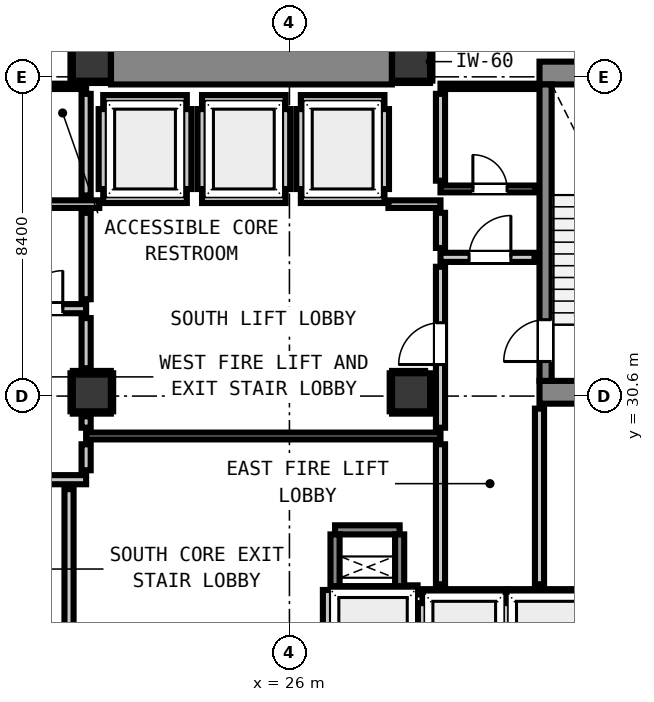
"""IFC4 building model, lengths in metres.
Left out: names, types, materials, properties, quantities, classifications, styles, units other than length and angle.
Written with IfcOpenShell. Run it as: python <this file> out.ifc"""

import sys

from ifc_helpers import new_model, si_unit, direction, frame, frame_2d, origin, origin_2d, place, context, subcontext, project, spatial, rectangle, extrude, element, fill, save


model = new_model("IFC4")
c1 = context("Model", 3, precision=1e-05, world=origin(), true_north=direction((0.0, 1.0)))
c2 = subcontext(c1, "Body", "Model", "MODEL_VIEW")
j1 = project(units=[si_unit("LENGTHUNIT", "METRE"), si_unit("PLANEANGLEUNIT", "RADIAN")], contexts=[c1])
p1 = place(None, origin())
s1 = spatial("IfcSite", under=j1, at=p1, CompositionType="ELEMENT")
p2 = place(p1, origin())
s2 = spatial("IfcBuilding", under=s1, at=p2, CompositionType="ELEMENT")
p3 = place(p2, frame((0.0, 0.0, 17.8)))
s3 = spatial("IfcBuildingStorey", under=s2, at=p3, CompositionType="ELEMENT", Elevation=17.8)
for number, where, z_axis, x_axis in (
    (1, (20.8, 39.4, 0.0), (0.0, 0.0, 1.0), (1.0, 0.0, 0.0)),
    (2, (29.2, 39.4, 0.0), (0.0, 0.0, 1.0), (1.0, 0.0, 0.0)),
):
    element("IfcColumn", number, at=place(p3, frame(where, z_axis=z_axis, x_axis=x_axis)), inside=s3, PredefinedType="COLUMN", context=c2, shape_type="SweptSolid", body=[
        extrude(rectangle(XDim=1.0, YDim=1.0, at=origin_2d()), origin(), (0.0, 0.0, 1.0), 4.2),
    ])
p4 = place(p3, frame((32.58, 39.1, 0.0), z_axis=(0.0, 0.0, 1.0), x_axis=(1.0, 0.0, 0.0)))
e3 = element("IfcWall", 3, at=p4, inside=s3, PredefinedType="SHEAR", context=c2, shape_type="SweptSolid", body=[
    extrude(rectangle(XDim=4.08, YDim=0.6, at=frame_2d((2.04, 0.0))), origin(), (0.0, 0.0, 1.0), 4.2),
])
p5 = place(p3, frame((32.58, 30.7, 0.0), z_axis=(0.0, 0.0, 1.0), x_axis=(1.0, 0.0, 0.0)))
e4 = element("IfcWall", 4, at=p5, inside=s3, PredefinedType="SHEAR", context=c2, shape_type="SweptSolid", body=[
    extrude(rectangle(XDim=3.415, YDim=0.6, at=frame_2d((1.708, 0.0))), origin(), (0.0, 0.0, 1.0), 4.2),
])
p6 = place(p3, frame((21.305, 39.4, 0.0), z_axis=(0.0, 0.0, 1.0), x_axis=(1.0, 0.0, 0.0)))
e5 = element("IfcWall", 5, at=p6, inside=s3, PredefinedType="SHEAR", context=c2, shape_type="SweptSolid", body=[
    extrude(rectangle(XDim=7.39, YDim=1.2, at=frame_2d((3.695, 0.0))), origin(), (0.0, 0.0, 1.0), 4.2),
])
p7 = place(p3, frame((32.74, 31.0, 0.0), z_axis=(0.0, 0.0, 1.0), x_axis=(0.0, 1.0, 0.0)))
e6 = element("IfcWall", 6, at=p7, inside=s3, PredefinedType="SHEAR", context=c2, shape_type="SweptSolid", body=[
    extrude(rectangle(XDim=7.8, YDim=0.32, at=frame_2d((3.9, 0.0))), origin(), (0.0, 0.0, 1.0), 4.2),
])
p8 = place(p7, frame((0.51, 0.0, 0.0)))
e7 = element("IfcOpeningElement", 7, at=p8, cuts=e6, PredefinedType="OPENING", context=c2, shape_type="SweptSolid", body=[
    extrude(rectangle(XDim=1.1, YDim=2.15, at=frame_2d((0.55, 1.075))), frame((0.0, 0.17, 0.0), z_axis=(0.0, -1.0, 0.0), x_axis=(1.0, 0.0, 0.0)), (0.0, 0.0, 1.0), 0.34),
])
for number, where, z_axis, x_axis in (
    (8, (27.2, 25.48, 0.0), (0.0, 0.0, 1.0), (1.0, 0.0, 0.0)),
    (9, (27.2, 27.08, 0.0), (0.0, 0.0, 1.0), (1.0, 0.0, 0.0)),
):
    element("IfcWall", number, at=place(p3, frame(where, z_axis=z_axis, x_axis=x_axis)), inside=s3, PredefinedType="SHEAR", context=c2, shape_type="SweptSolid", body=[
        extrude(rectangle(XDim=1.7, YDim=0.24, at=frame_2d((0.85, 0.0))), origin(), (0.0, 0.0, 1.0), 4.2),
    ])
for number, where, z_axis, x_axis in (
    (10, (27.2, 25.6, 0.0), (0.0, 0.0, 1.0), (0.0, 1.0, 0.0)),
    (11, (28.9, 25.6, 0.0), (0.0, 0.0, 1.0), (0.0, 1.0, 0.0)),
):
    element("IfcWall", number, at=place(p3, frame(where, z_axis=z_axis, x_axis=x_axis)), inside=s3, PredefinedType="SHEAR", context=c2, shape_type="SweptSolid", body=[
        extrude(rectangle(XDim=1.36, YDim=0.24, at=frame_2d((0.68, 0.0))), origin(), (0.0, 0.0, 1.0), 4.2),
    ])
for number, where, z_axis, x_axis in (
    (12, (20.8, 30.7, 0.0), (0.0, 0.0, 1.0), (1.0, 0.0, 0.0)),
    (13, (29.2, 30.7, 0.0), (0.0, 0.0, 1.0), (1.0, 0.0, 0.0)),
):
    element("IfcColumn", number, at=place(p3, frame(where, z_axis=z_axis, x_axis=x_axis)), inside=s3, PredefinedType="COLUMN", context=c2, shape_type="SweptSolid", body=[
        extrude(rectangle(XDim=1.0, YDim=1.0, at=origin_2d()), origin(), (0.0, 0.0, 1.0), 4.2),
    ])
for number, where, z_axis, x_axis in (
    (14, (21.1, 35.8, 0.0), (0.0, 0.0, 1.0), (1.0, 0.0, 0.0)),
    (15, (21.1, 38.4, 0.0), (0.0, 0.0, 1.0), (1.0, 0.0, 0.0)),
):
    element("IfcWall", number, at=place(p3, frame(where, z_axis=z_axis, x_axis=x_axis)), inside=s3, PredefinedType="PARTITIONING", context=c2, shape_type="SweptSolid", body=[
        extrude(rectangle(XDim=2.2, YDim=0.24, at=frame_2d((1.1, 0.0))), origin(), (0.0, 0.0, 1.0), 3.78),
    ])
p9 = place(p3, frame((21.1, 36.048, 0.0), z_axis=(0.0, 0.0, 1.0), x_axis=(0.0, 1.0, 0.0)))
e16 = element("IfcWall", 16, at=p9, inside=s3, PredefinedType="PARTITIONING", context=c2, shape_type="SweptSolid", body=[
    extrude(rectangle(XDim=2.104, YDim=0.24, at=frame_2d((1.052, 0.0))), origin(), (0.0, 0.0, 1.0), 1.785),
])
p10 = place(p3, frame((23.3, 36.048, 0.0), z_axis=(0.0, 0.0, 1.0), x_axis=(0.0, 1.0, 0.0)))
e17 = element("IfcWall", 17, at=p10, inside=s3, PredefinedType="PARTITIONING", context=c2, shape_type="SweptSolid", body=[
    extrude(rectangle(XDim=2.104, YDim=0.24, at=frame_2d((1.052, 0.0))), origin(), (0.0, 0.0, 1.0), 3.78),
])
for number, where, z_axis, x_axis in (
    (18, (23.7, 35.8, 0.0), (0.0, 0.0, 1.0), (1.0, 0.0, 0.0)),
    (19, (23.7, 38.4, 0.0), (0.0, 0.0, 1.0), (1.0, 0.0, 0.0)),
):
    element("IfcWall", number, at=place(p3, frame(where, z_axis=z_axis, x_axis=x_axis)), inside=s3, PredefinedType="PARTITIONING", context=c2, shape_type="SweptSolid", body=[
        extrude(rectangle(XDim=2.2, YDim=0.24, at=frame_2d((1.1, 0.0))), origin(), (0.0, 0.0, 1.0), 3.78),
    ])
for number, where, z_axis, x_axis in (
    (20, (23.7, 36.048, 0.0), (0.0, 0.0, 1.0), (0.0, 1.0, 0.0)),
    (21, (25.9, 36.048, 0.0), (0.0, 0.0, 1.0), (0.0, 1.0, 0.0)),
):
    element("IfcWall", number, at=place(p3, frame(where, z_axis=z_axis, x_axis=x_axis)), inside=s3, PredefinedType="PARTITIONING", context=c2, shape_type="SweptSolid", body=[
        extrude(rectangle(XDim=2.104, YDim=0.24, at=frame_2d((1.052, 0.0))), origin(), (0.0, 0.0, 1.0), 3.78),
    ])
for number, where, z_axis, x_axis in (
    (22, (26.3, 35.8, 0.0), (0.0, 0.0, 1.0), (1.0, 0.0, 0.0)),
    (23, (26.3, 38.4, 0.0), (0.0, 0.0, 1.0), (1.0, 0.0, 0.0)),
):
    element("IfcWall", number, at=place(p3, frame(where, z_axis=z_axis, x_axis=x_axis)), inside=s3, PredefinedType="PARTITIONING", context=c2, shape_type="SweptSolid", body=[
        extrude(rectangle(XDim=2.2, YDim=0.24, at=frame_2d((1.1, 0.0))), origin(), (0.0, 0.0, 1.0), 3.78),
    ])
p11 = place(p3, frame((26.3, 36.048, 0.0), z_axis=(0.0, 0.0, 1.0), x_axis=(0.0, 1.0, 0.0)))
e24 = element("IfcWall", 24, at=p11, inside=s3, PredefinedType="PARTITIONING", context=c2, shape_type="SweptSolid", body=[
    extrude(rectangle(XDim=2.104, YDim=0.24, at=frame_2d((1.052, 0.0))), origin(), (0.0, 0.0, 1.0), 3.78),
])
p12 = place(p3, frame((28.5, 36.048, 0.0), z_axis=(0.0, 0.0, 1.0), x_axis=(0.0, 1.0, 0.0)))
e25 = element("IfcWall", 25, at=p12, inside=s3, PredefinedType="PARTITIONING", context=c2, shape_type="SweptSolid", body=[
    extrude(rectangle(XDim=2.104, YDim=0.24, at=frame_2d((1.052, 0.0))), origin(), (0.0, 0.0, 1.0), 1.785),
])
p13 = place(p3, frame((29.5, 25.4, 0.0), z_axis=(0.0, 0.0, 1.0), x_axis=(1.0, 0.0, 0.0)))
e26 = element("IfcWall", 26, at=p13, inside=s3, PredefinedType="PARTITIONING", context=c2, shape_type="SweptSolid", body=[
    extrude(rectangle(XDim=2.2, YDim=0.24, at=frame_2d((1.1, 0.0))), origin(), (0.0, 0.0, 1.0), 3.78),
])
p14 = place(p3, frame((29.5, 22.632, 0.0), z_axis=(0.0, 0.0, 1.0), x_axis=(0.0, 1.0, 0.0)))
e27 = element("IfcWall", 27, at=p14, inside=s3, PredefinedType="PARTITIONING", context=c2, shape_type="SweptSolid", body=[
    extrude(rectangle(XDim=2.52, YDim=0.24, at=frame_2d((1.26, 0.0))), origin(), (0.0, 0.0, 1.0), 1.785),
])
p15 = place(p3, frame((31.7, 22.73, 0.0), z_axis=(0.0, 0.0, 1.0), x_axis=(0.0, 1.0, 0.0)))
e28 = element("IfcWall", 28, at=p15, inside=s3, PredefinedType="PARTITIONING", context=c2, shape_type="SweptSolid", body=[
    extrude(rectangle(XDim=2.422, YDim=0.24, at=frame_2d((1.211, 0.0))), origin(), (0.0, 0.0, 1.0), 3.78),
])
p16 = place(p3, frame((31.828, 25.4, 0.0), z_axis=(0.0, 0.0, 1.0), x_axis=(1.0, 0.0, 0.0)))
e29 = element("IfcWall", 29, at=p16, inside=s3, PredefinedType="PARTITIONING", context=c2, shape_type="SweptSolid", body=[
    extrude(rectangle(XDim=2.072, YDim=0.24, at=frame_2d((1.036, 0.0))), origin(), (0.0, 0.0, 1.0), 3.78),
])
p17 = place(p3, frame((29.103, 25.5, 0.0), z_axis=(0.0, 0.0, 1.0), x_axis=(1.0, 0.0, 0.0)))
e30 = element("IfcWall", 30, at=p17, inside=s3, PredefinedType="PARTITIONING", context=c2, shape_type="SweptSolid", body=[
    extrude(rectangle(XDim=0.269, YDim=0.24, at=frame_2d((0.135, 0.0))), origin(), (0.0, 0.0, 1.0), 3.78),
])
p18 = place(p3, frame((27.0, 22.73, 0.0), z_axis=(0.0, 0.0, 1.0), x_axis=(0.0, 1.0, 0.0)))
e31 = element("IfcWall", 31, at=p18, inside=s3, PredefinedType="PARTITIONING", context=c2, shape_type="SweptSolid", body=[
    extrude(rectangle(XDim=2.768, YDim=0.24, at=frame_2d((1.384, 0.0))), origin(), (0.0, 0.0, 1.0), 3.78),
])
p19 = place(p3, frame((17.45, 28.4, 0.0), z_axis=(0.0, 0.0, 1.0), x_axis=(1.0, 0.0, 0.0)))
e32 = element("IfcWall", 32, at=p19, inside=s3, PredefinedType="PARTITIONING", context=c2, shape_type="SweptSolid", body=[
    extrude(rectangle(XDim=3.2, YDim=0.24, at=frame_2d((1.6, 0.0))), origin(), (0.0, 0.0, 1.0), 3.78),
])
p20 = place(p19, frame((0.784, 0.0, 0.0)))
e33 = element("IfcOpeningElement", 33, at=p20, cuts=e32, PredefinedType="OPENING", context=c2, shape_type="SweptSolid", body=[
    extrude(rectangle(XDim=1.1, YDim=2.15, at=frame_2d((0.55, 1.075))), frame((0.0, 0.13, 0.0), z_axis=(0.0, -1.0, 0.0), x_axis=(1.0, 0.0, 0.0)), (0.0, 0.0, 1.0), 0.26),
])
p21 = place(p3, frame((17.45, 32.9, 0.0), z_axis=(0.0, 0.0, 1.0), x_axis=(1.0, 0.0, 0.0)))
e34 = element("IfcWall", 34, at=p21, inside=s3, PredefinedType="PARTITIONING", context=c2, shape_type="SweptSolid", body=[
    extrude(rectangle(XDim=3.2, YDim=0.24, at=frame_2d((1.6, 0.0))), origin(), (0.0, 0.0, 1.0), 3.78),
])
p22 = place(p21, frame((0.159, 0.0, 0.0)))
e35 = element("IfcOpeningElement", 35, at=p22, cuts=e34, PredefinedType="OPENING", context=c2, shape_type="SweptSolid", body=[
    extrude(rectangle(XDim=1.1, YDim=2.15, at=frame_2d((0.55, 1.075))), frame((0.0, 0.13, 0.0), z_axis=(0.0, -1.0, 0.0), x_axis=(1.0, 0.0, 0.0)), (0.0, 0.0, 1.0), 0.26),
])
p23 = place(p21, frame((1.586, 0.0, 0.0)))
e36 = element("IfcOpeningElement", 36, at=p23, cuts=e34, PredefinedType="OPENING", context=c2, shape_type="SweptSolid", body=[
    extrude(rectangle(XDim=1.0, YDim=2.15, at=frame_2d((0.5, 1.075))), frame((0.0, 0.13, 0.0), z_axis=(0.0, -1.0, 0.0), x_axis=(1.0, 0.0, 0.0)), (0.0, 0.0, 1.0), 0.26),
])
p24 = place(p3, frame((29.975, 34.25, 0.0), z_axis=(0.0, 0.0, 1.0), x_axis=(1.0, 0.0, 0.0)))
e37 = element("IfcWall", 37, at=p24, inside=s3, PredefinedType="PARTITIONING", context=c2, shape_type="SweptSolid", body=[
    extrude(rectangle(XDim=2.475, YDim=0.24, at=frame_2d((1.237, 0.0))), origin(), (0.0, 0.0, 1.0), 3.78),
])
p25 = place(p24, frame((0.752, 0.0, 0.0)))
e38 = element("IfcOpeningElement", 38, at=p25, cuts=e37, PredefinedType="OPENING", context=c2, shape_type="SweptSolid", body=[
    extrude(rectangle(XDim=1.1, YDim=2.15, at=frame_2d((0.55, 1.075))), frame((0.0, 0.13, 0.0), z_axis=(0.0, -1.0, 0.0), x_axis=(1.0, 0.0, 0.0)), (0.0, 0.0, 1.0), 0.26),
])
p26 = place(p3, frame((18.95, 35.65, 0.0), z_axis=(0.0, 0.0, 1.0), x_axis=(1.0, 0.0, 0.0)))
e39 = element("IfcWall", 39, at=p26, inside=s3, PredefinedType="PARTITIONING", context=c2, shape_type="SweptSolid", body=[
    extrude(rectangle(XDim=2.046, YDim=0.2, at=frame_2d((1.023, 0.0))), origin(), (0.0, 0.0, 1.0), 3.78),
])
p27 = place(p3, frame((28.604, 35.65, 0.0), z_axis=(0.0, 0.0, 1.0), x_axis=(1.0, 0.0, 0.0)))
e40 = element("IfcWall", 40, at=p27, inside=s3, PredefinedType="PARTITIONING", context=c2, shape_type="SweptSolid", body=[
    extrude(rectangle(XDim=1.371, YDim=0.2, at=frame_2d((0.686, 0.0))), origin(), (0.0, 0.0, 1.0), 3.78),
])
p28 = place(p3, frame((20.65, 29.55, 0.0), z_axis=(0.0, 0.0, 1.0), x_axis=(1.0, 0.0, 0.0)))
e41 = element("IfcWall", 41, at=p28, inside=s3, PredefinedType="PARTITIONING", context=c2, shape_type="SweptSolid", body=[
    extrude(rectangle(XDim=9.325, YDim=0.18, at=frame_2d((4.663, 0.0))), origin(), (0.0, 0.0, 1.0), 3.78),
])
p29 = place(p3, frame((29.975, 36.05, 0.0), z_axis=(0.0, 0.0, 1.0), x_axis=(1.0, 0.0, 0.0)))
e42 = element("IfcWall", 42, at=p29, inside=s3, PredefinedType="PARTITIONING", context=c2, shape_type="SweptSolid", body=[
    extrude(rectangle(XDim=2.505, YDim=0.18, at=frame_2d((1.252, 0.0))), origin(), (0.0, 0.0, 1.0), 3.78),
])
p30 = place(p29, frame((0.852, 0.0, 0.0)))
e43 = element("IfcOpeningElement", 43, at=p30, cuts=e42, PredefinedType="OPENING", context=c2, shape_type="SweptSolid", body=[
    extrude(rectangle(XDim=0.9, YDim=2.1, at=frame_2d((0.45, 1.05))), frame((0.0, 0.1, 0.0), z_axis=(0.0, -1.0, 0.0), x_axis=(1.0, 0.0, 0.0)), (0.0, 0.0, 1.0), 0.2),
])
p31 = place(p3, frame((18.95, 38.75, 0.0), z_axis=(0.0, 0.0, 1.0), x_axis=(1.0, 0.0, 0.0)))
e44 = element("IfcWall", 44, at=p31, inside=s3, PredefinedType="PARTITIONING", context=c2, shape_type="SweptSolid", body=[
    extrude(rectangle(XDim=1.7, YDim=0.14, at=frame_2d((0.85, 0.0))), origin(), (0.0, 0.0, 1.0), 1.785),
])
p32 = place(p3, frame((29.975, 38.75, 0.0), z_axis=(0.0, 0.0, 1.0), x_axis=(1.0, 0.0, 0.0)))
e45 = element("IfcWall", 45, at=p32, inside=s3, PredefinedType="PARTITIONING", context=c2, shape_type="SweptSolid", body=[
    extrude(rectangle(XDim=2.525, YDim=0.14, at=frame_2d((1.262, 0.0))), origin(), (0.0, 0.0, 1.0), 1.785),
])
p33 = place(p3, frame((20.2, 22.586, 0.0), z_axis=(0.0, 0.0, 1.0), x_axis=(0.0, 1.0, 0.0)))
e46 = element("IfcWall", 46, at=p33, inside=s3, PredefinedType="PARTITIONING", context=c2, shape_type="SweptSolid", body=[
    extrude(rectangle(XDim=5.566, YDim=0.24, at=frame_2d((2.783, 0.0))), origin(), (0.0, 0.0, 1.0), 1.785),
])
p34 = place(p3, frame((20.65, 28.648, 0.0), z_axis=(0.0, 0.0, 1.0), x_axis=(0.0, 1.0, 0.0)))
e47 = element("IfcWall", 47, at=p34, inside=s3, PredefinedType="PARTITIONING", context=c2, shape_type="SweptSolid", body=[
    extrude(rectangle(XDim=0.684, YDim=0.24, at=frame_2d((0.342, 0.0))), origin(), (0.0, 0.0, 1.0), 1.785),
])
p35 = place(p3, frame((20.65, 29.768, 0.0), z_axis=(0.0, 0.0, 1.0), x_axis=(0.0, 1.0, 0.0)))
e48 = element("IfcWall", 48, at=p35, inside=s3, PredefinedType="PARTITIONING", context=c2, shape_type="SweptSolid", body=[
    extrude(rectangle(XDim=0.3, YDim=0.24, at=frame_2d((0.15, 0.0))), origin(), (0.0, 0.0, 1.0), 1.785),
])
p36 = place(p3, frame((20.65, 31.332, 0.0), z_axis=(0.0, 0.0, 1.0), x_axis=(0.0, 1.0, 0.0)))
e49 = element("IfcWall", 49, at=p36, inside=s3, PredefinedType="PARTITIONING", context=c2, shape_type="SweptSolid", body=[
    extrude(rectangle(XDim=1.32, YDim=0.24, at=frame_2d((0.66, 0.0))), origin(), (0.0, 0.0, 1.0), 1.785),
])
p37 = place(p3, frame((20.65, 33.148, 0.0), z_axis=(0.0, 0.0, 1.0), x_axis=(0.0, 1.0, 0.0)))
e50 = element("IfcWall", 50, at=p37, inside=s3, PredefinedType="PARTITIONING", context=c2, shape_type="SweptSolid", body=[
    extrude(rectangle(XDim=2.274, YDim=0.24, at=frame_2d((1.137, 0.0))), origin(), (0.0, 0.0, 1.0), 1.785),
])
p38 = place(p3, frame((20.65, 35.878, 0.0), z_axis=(0.0, 0.0, 1.0), x_axis=(0.0, 1.0, 0.0)))
e51 = element("IfcWall", 51, at=p38, inside=s3, PredefinedType="PARTITIONING", context=c2, shape_type="SweptSolid", body=[
    extrude(rectangle(XDim=2.674, YDim=0.24, at=frame_2d((1.337, 0.0))), origin(), (0.0, 0.0, 1.0), 1.785),
])
p39 = place(p3, frame((29.975, 25.648, 0.0), z_axis=(0.0, 0.0, 1.0), x_axis=(0.0, 1.0, 0.0)))
e52 = element("IfcWall", 52, at=p39, inside=s3, PredefinedType="PARTITIONING", context=c2, shape_type="SweptSolid", body=[
    extrude(rectangle(XDim=3.684, YDim=0.24, at=frame_2d((1.842, 0.0))), origin(), (0.0, 0.0, 1.0), 3.78),
])
p40 = place(p3, frame((29.975, 29.768, 0.0), z_axis=(0.0, 0.0, 1.0), x_axis=(0.0, 1.0, 0.0)))
e53 = element("IfcWall", 53, at=p40, inside=s3, PredefinedType="PARTITIONING", context=c2, shape_type="SweptSolid", body=[
    extrude(rectangle(XDim=4.234, YDim=0.24, at=frame_2d((2.117, 0.0))), origin(), (0.0, 0.0, 1.0), 3.78),
])
p41 = place(p40, frame((1.662, 0.0, 0.0)))
e54 = element("IfcOpeningElement", 54, at=p41, cuts=e53, PredefinedType="OPENING", context=c2, shape_type="SweptSolid", body=[
    extrude(rectangle(XDim=1.1, YDim=2.15, at=frame_2d((0.55, 1.075))), frame((0.0, 0.13, 0.0), z_axis=(0.0, -1.0, 0.0), x_axis=(1.0, 0.0, 0.0)), (0.0, 0.0, 1.0), 0.26),
])
p42 = place(p3, frame((29.975, 34.498, 0.0), z_axis=(0.0, 0.0, 1.0), x_axis=(0.0, 1.0, 0.0)))
e55 = element("IfcWall", 55, at=p42, inside=s3, PredefinedType="PARTITIONING", context=c2, shape_type="SweptSolid", body=[
    extrude(rectangle(XDim=0.924, YDim=0.24, at=frame_2d((0.462, 0.0))), origin(), (0.0, 0.0, 1.0), 3.78),
])
p43 = place(p3, frame((29.975, 36.268, 0.0), z_axis=(0.0, 0.0, 1.0), x_axis=(0.0, 1.0, 0.0)))
e56 = element("IfcWall", 56, at=p43, inside=s3, PredefinedType="PARTITIONING", context=c2, shape_type="SweptSolid", body=[
    extrude(rectangle(XDim=2.284, YDim=0.24, at=frame_2d((1.142, 0.0))), origin(), (0.0, 0.0, 1.0), 3.78),
])
p44 = place(p3, frame((32.58, 25.648, 0.0), z_axis=(0.0, 0.0, 1.0), x_axis=(0.0, 1.0, 0.0)))
e57 = element("IfcWall", 57, at=p44, inside=s3, PredefinedType="PARTITIONING", context=c2, shape_type="SweptSolid", body=[
    extrude(rectangle(XDim=4.622, YDim=0.24, at=frame_2d((2.311, 0.0))), origin(), (0.0, 0.0, 1.0), 3.78),
])
p45 = place(p3, frame((20.3, 38.868, 0.0), z_axis=(0.0, 0.0, 1.0), x_axis=(1.0, 0.0, 0.0)))
e58 = element("IfcWall", 58, at=p45, inside=s3, PredefinedType="PARTITIONING", context=c2, shape_type="SweptSolid", body=[
    extrude(rectangle(XDim=0.99, YDim=0.06, at=frame_2d((0.495, 0.0))), origin(), (0.0, 0.0, 1.0), 1.45),
])
p46 = place(p3, frame((20.268, 38.9, 0.0), z_axis=(0.0, 0.0, 1.0), x_axis=(0.0, 1.0, 0.0)))
e59 = element("IfcWall", 59, at=p46, inside=s3, PredefinedType="PARTITIONING", context=c2, shape_type="SweptSolid", body=[
    extrude(rectangle(XDim=1.0, YDim=0.06, at=frame_2d((0.5, 0.0))), origin(), (0.0, 0.0, 1.0), 1.45),
])
p47 = place(p3, frame((28.71, 38.868, 0.0), z_axis=(0.0, 0.0, 1.0), x_axis=(1.0, 0.0, 0.0)))
e60 = element("IfcWall", 60, at=p47, inside=s3, PredefinedType="PARTITIONING", context=c2, shape_type="SweptSolid", body=[
    extrude(rectangle(XDim=0.99, YDim=0.06, at=frame_2d((0.495, 0.0))), origin(), (0.0, 0.0, 1.0), 1.45),
])
for number, where, z_axis, x_axis in (
    (61, (29.732, 38.9, 0.0), (0.0, 0.0, 1.0), (0.0, 1.0, 0.0)),
    (62, (20.3, 30.168, 0.0), (0.0, 0.0, 1.0), (1.0, 0.0, 0.0)),
    (63, (20.3, 31.232, 0.0), (0.0, 0.0, 1.0), (1.0, 0.0, 0.0)),
    (64, (20.268, 30.2, 0.0), (0.0, 0.0, 1.0), (0.0, 1.0, 0.0)),
    (65, (21.332, 30.2, 0.0), (0.0, 0.0, 1.0), (0.0, 1.0, 0.0)),
    (66, (28.7, 30.168, 0.0), (0.0, 0.0, 1.0), (1.0, 0.0, 0.0)),
):
    element("IfcWall", number, at=place(p3, frame(where, z_axis=z_axis, x_axis=x_axis)), inside=s3, PredefinedType="PARTITIONING", context=c2, shape_type="SweptSolid", body=[
        extrude(rectangle(XDim=1.0, YDim=0.06, at=frame_2d((0.5, 0.0))), origin(), (0.0, 0.0, 1.0), 1.45),
    ])
p48 = place(p3, frame((28.7, 31.232, 0.0), z_axis=(0.0, 0.0, 1.0), x_axis=(1.0, 0.0, 0.0)))
e67 = element("IfcWall", 67, at=p48, inside=s3, PredefinedType="PARTITIONING", context=c2, shape_type="SweptSolid", body=[
    extrude(rectangle(XDim=0.871, YDim=0.06, at=frame_2d((0.436, 0.0))), origin(), (0.0, 0.0, 1.0), 1.45),
])
p49 = place(p3, frame((28.668, 30.2, 0.0), z_axis=(0.0, 0.0, 1.0), x_axis=(0.0, 1.0, 0.0)))
e68 = element("IfcWall", 68, at=p49, inside=s3, PredefinedType="PARTITIONING", context=c2, shape_type="SweptSolid", body=[
    extrude(rectangle(XDim=1.0, YDim=0.06, at=frame_2d((0.5, 0.0))), origin(), (0.0, 0.0, 1.0), 1.45),
])
p50 = place(p3, frame((29.732, 30.2, 0.0), z_axis=(0.0, 0.0, 1.0), x_axis=(0.0, 1.0, 0.0)))
e69 = element("IfcWall", 69, at=p50, inside=s3, PredefinedType="PARTITIONING", context=c2, shape_type="SweptSolid", body=[
    extrude(rectangle(XDim=0.852, YDim=0.06, at=frame_2d((0.426, 0.0))), origin(), (0.0, 0.0, 1.0), 1.45),
])
p51 = place(p8, origin())
e70 = element("IfcDoor", 70, at=p51, inside=s3, OperationType="SINGLE_SWING_LEFT", PredefinedType="DOOR", context=c2, shape_type="SweptSolid", body=[
    extrude(rectangle(XDim=1.1, YDim=2.15, at=frame_2d((0.55, 1.075))), frame((0.0, 0.025, 0.0), z_axis=(0.0, -1.0, 0.0), x_axis=(1.0, 0.0, 0.0)), (0.0, 0.0, 1.0), 0.05),
])
fill(e7, e70)
p52 = place(p41, origin())
e71 = element("IfcDoor", 71, at=p52, inside=s3, OperationType="SINGLE_SWING_LEFT", PredefinedType="DOOR", context=c2, shape_type="SweptSolid", body=[
    extrude(rectangle(XDim=1.1, YDim=2.15, at=frame_2d((0.55, 1.075))), frame((0.0, 0.025, 0.0), z_axis=(0.0, -1.0, 0.0), x_axis=(1.0, 0.0, 0.0)), (0.0, 0.0, 1.0), 0.05),
])
fill(e54, e71)
p53 = place(p25, origin())
e72 = element("IfcDoor", 72, at=p53, inside=s3, OperationType="SINGLE_SWING_RIGHT", PredefinedType="DOOR", context=c2, shape_type="SweptSolid", body=[
    extrude(rectangle(XDim=1.1, YDim=2.15, at=frame_2d((0.55, 1.075))), frame((0.0, 0.025, 0.0), z_axis=(0.0, -1.0, 0.0), x_axis=(1.0, 0.0, 0.0)), (0.0, 0.0, 1.0), 0.05),
])
fill(e38, e72)
p54 = place(p23, origin())
e73 = element("IfcDoor", 73, at=p54, inside=s3, OperationType="SINGLE_SWING_RIGHT", PredefinedType="DOOR", context=c2, shape_type="SweptSolid", body=[
    extrude(rectangle(XDim=1.0, YDim=2.15, at=frame_2d((0.5, 1.075))), frame((0.0, 0.025, 0.0), z_axis=(0.0, -1.0, 0.0), x_axis=(1.0, 0.0, 0.0)), (0.0, 0.0, 1.0), 0.05),
])
fill(e36, e73)
p55 = place(p30, origin())
e74 = element("IfcDoor", 74, at=p55, inside=s3, OperationType="SINGLE_SWING_LEFT", PredefinedType="DOOR", context=c2, shape_type="SweptSolid", body=[
    extrude(rectangle(XDim=0.9, YDim=2.1, at=frame_2d((0.45, 1.05))), frame((0.0, 0.025, 0.0), z_axis=(0.0, -1.0, 0.0), x_axis=(1.0, 0.0, 0.0)), (0.0, 0.0, 1.0), 0.05),
])
fill(e43, e74)
save(model, sys.argv[1])
